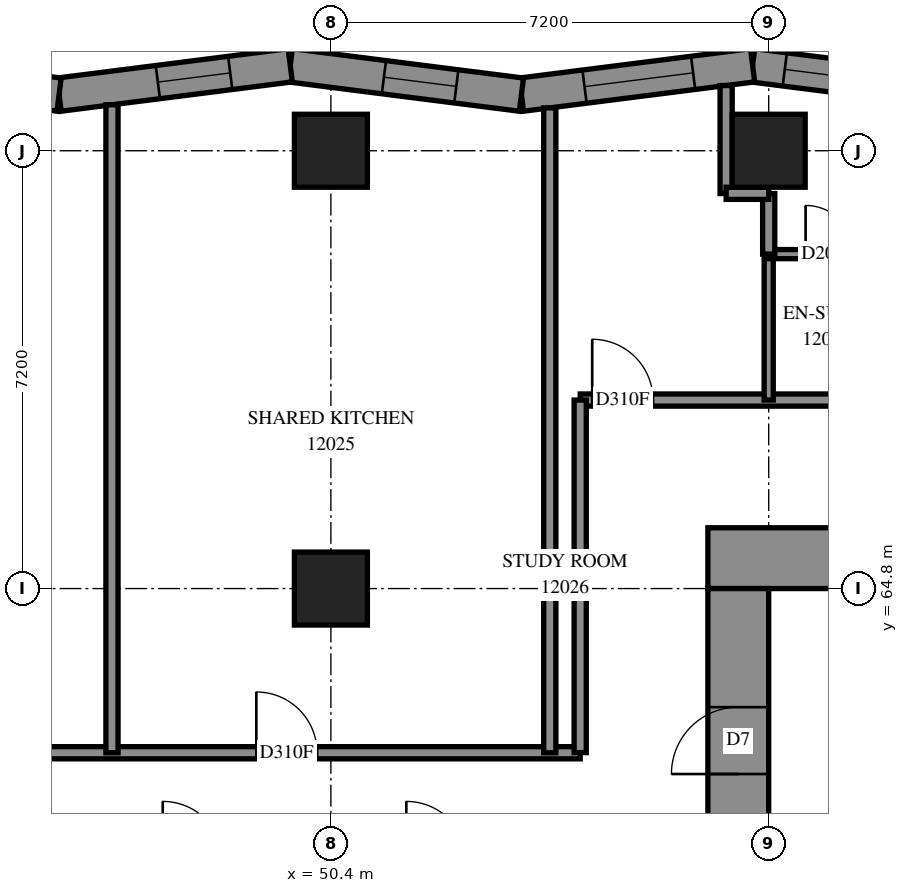
"""IFC4 building model, lengths in metres.
Left out: names, types, materials, properties, quantities, classifications, styles, units other than length and angle.
Written with IfcOpenShell. Run it as: python <this file> out.ifc"""

import sys

from ifc_helpers import new_model, si_unit, direction, frame, frame_2d, origin, origin_2d, place, context, subcontext, project, spatial, polyline, rectangle, outline, extrude, element, fill, save


model = new_model("IFC4")
c1 = context("Model", 3, precision=1e-05, world=origin(), true_north=direction((0.0, 1.0)))
c2 = subcontext(c1, "Body", "Model", "MODEL_VIEW")
j1 = project(units=[si_unit("LENGTHUNIT", "METRE"), si_unit("PLANEANGLEUNIT", "RADIAN")], contexts=[c1])
p1 = place(None, origin())
s1 = spatial("IfcSite", under=j1, at=p1, CompositionType="ELEMENT")
p2 = place(p1, origin())
s2 = spatial("IfcBuilding", under=s1, at=p2, CompositionType="ELEMENT")
p3 = place(p2, frame((0.0, 0.0, 47.4)))
s3 = spatial("IfcBuildingStorey", under=s2, at=p3, CompositionType="ELEMENT", Elevation=47.4)
for number, where, z_axis, x_axis in (
    (1, (50.4, 64.8, 0.0), (0.0, 0.0, 1.0), (1.0, 0.0, 0.0)),
    (2, (50.4, 72.0, 0.0), (0.0, 0.0, 1.0), (1.0, 0.0, 0.0)),
    (3, (57.6, 72.0, 0.0), (0.0, 0.0, 1.0), (1.0, 0.0, 0.0)),
):
    element("IfcColumn", number, at=place(p3, frame(where, z_axis=z_axis, x_axis=x_axis)), inside=s3, PredefinedType="COLUMN", context=c2, shape_type="SweptSolid", body=[
        extrude(rectangle(XDim=1.2, YDim=1.2, at=origin_2d()), origin(), (0.0, 0.0, 1.0), 3.1),
    ])
p4 = place(p3, frame((56.6, 65.3, -0.3), z_axis=(0.0, 0.0, 1.0), x_axis=(1.0, 0.0, 0.0)))
e4 = element("IfcWall", 4, at=p4, inside=s3, PredefinedType="SHEAR", context=c2, shape_type="SweptSolid", body=[
    extrude(rectangle(XDim=16.4, YDim=1.0, at=frame_2d((8.2, 0.0))), origin(), (0.0, 0.0, 1.0), 2.7),
])
p5 = place(p4, frame((11.0, 0.0, 0.3)))
e5 = element("IfcOpeningElement", 5, at=p5, cuts=e4, PredefinedType="OPENING", context=c2, shape_type="SweptSolid", body=[
    extrude(rectangle(XDim=0.8, YDim=2.1, at=frame_2d((0.4, 1.05))), frame((0.0, 0.51, 0.0), z_axis=(0.0, -1.0, 0.0), x_axis=(1.0, 0.0, 0.0)), (0.0, 0.0, 1.0), 1.02),
])
p6 = place(p3, frame((57.1, 50.4, -0.3), z_axis=(0.0, 0.0, 1.0), x_axis=(0.0, 1.0, 0.0)))
e6 = element("IfcWall", 6, at=p6, inside=s3, PredefinedType="SHEAR", context=c2, shape_type="SweptSolid", body=[
    extrude(rectangle(XDim=14.4, YDim=1.0, at=frame_2d((7.2, 0.0))), origin(), (0.0, 0.0, 1.0), 2.7),
])
p7 = place(p6, frame((4.55, 0.0, 0.3)))
e7 = element("IfcOpeningElement", 7, at=p7, cuts=e6, PredefinedType="OPENING", context=c2, shape_type="SweptSolid", body=[
    extrude(rectangle(XDim=1.1, YDim=2.1, at=frame_2d((0.55, 1.05))), frame((0.0, 0.51, 0.0), z_axis=(0.0, -1.0, 0.0), x_axis=(1.0, 0.0, 0.0)), (0.0, 0.0, 1.0), 1.02),
])
p8 = place(p6, frame((11.35, 0.0, 0.3)))
e8 = element("IfcOpeningElement", 8, at=p8, cuts=e6, PredefinedType="OPENING", context=c2, shape_type="SweptSolid", body=[
    extrude(rectangle(XDim=1.1, YDim=2.1, at=frame_2d((0.55, 1.05))), frame((0.0, 0.51, 0.0), z_axis=(0.0, -1.0, 0.0), x_axis=(1.0, 0.0, 0.0)), (0.0, 0.0, 1.0), 1.02),
])
p9 = place(p3, frame((61.137, 72.923, 0.0), z_axis=(0.0, 0.0, 1.0), x_axis=(-0.9920587623, 0.1257752442, 0.0)))
e9 = element("IfcWall", 9, at=p9, inside=s3, PredefinedType="SOLIDWALL", context=c2, shape_type="SweptSolid", body=[
    extrude(outline(polyline([(0.035, -0.275), (3.867, -0.275), (3.797, 0.275), (-0.035, 0.275), (0.035, -0.275)])), origin(), (0.0, 0.0, 1.0), 3.1),
])
p10 = place(p9, frame((0.499, 0.0, 0.5)))
e10 = element("IfcOpeningElement", 10, at=p10, cuts=e9, PredefinedType="OPENING", context=c2, shape_type="SweptSolid", body=[
    extrude(rectangle(XDim=2.8, YDim=2.45, at=frame_2d((1.4, 1.225))), frame((0.0, 0.285, 0.0), z_axis=(0.0, -1.0, 0.0), x_axis=(1.0, 0.0, 0.0)), (0.0, 0.0, 1.0), 0.57),
])
p11 = place(p3, frame((57.335, 73.405, 0.0), z_axis=(0.0, 0.0, 1.0), x_axis=(-0.9920583495, -0.1257785003, 0.0)))
e11 = element("IfcWall", 11, at=p11, inside=s3, PredefinedType="SOLIDWALL", context=c2, shape_type="SweptSolid", body=[
    extrude(outline(polyline([(-0.035, -0.275), (3.797, -0.275), (3.867, 0.275), (0.035, 0.275), (-0.035, -0.275)])), origin(), (0.0, 0.0, 1.0), 3.1),
])
p12 = place(p11, frame((0.986, 0.0, 0.7)))
e12 = element("IfcOpeningElement", 12, at=p12, cuts=e11, PredefinedType="OPENING", context=c2, shape_type="SweptSolid", body=[
    extrude(rectangle(XDim=1.8, YDim=2.2, at=frame_2d((0.9, 1.1))), frame((0.0, 0.285, 0.0), z_axis=(0.0, -1.0, 0.0), x_axis=(1.0, 0.0, 0.0)), (0.0, 0.0, 1.0), 0.57),
])
p13 = place(p3, frame((53.533, 72.923, 0.0), z_axis=(0.0, 0.0, 1.0), x_axis=(-0.9920583495, 0.1257785003, 0.0)))
e13 = element("IfcWall", 13, at=p13, inside=s3, PredefinedType="SOLIDWALL", context=c2, shape_type="SweptSolid", body=[
    extrude(outline(polyline([(0.035, -0.275), (3.867, -0.275), (3.797, 0.275), (-0.035, 0.275), (0.035, -0.275)])), origin(), (0.0, 0.0, 1.0), 3.1),
])
p14 = place(p13, frame((1.079, 0.0, 0.5)))
e14 = element("IfcOpeningElement", 14, at=p14, cuts=e13, PredefinedType="OPENING", context=c2, shape_type="SweptSolid", body=[
    extrude(rectangle(XDim=1.2, YDim=2.45, at=frame_2d((0.6, 1.225))), frame((0.0, 0.285, 0.0), z_axis=(0.0, -1.0, 0.0), x_axis=(1.0, 0.0, 0.0)), (0.0, 0.0, 1.0), 0.57),
])
p15 = place(p3, frame((49.732, 73.405, 0.0), z_axis=(0.0, 0.0, 1.0), x_axis=(-0.9920583495, -0.1257785003, 0.0)))
e15 = element("IfcWall", 15, at=p15, inside=s3, PredefinedType="SOLIDWALL", context=c2, shape_type="SweptSolid", body=[
    extrude(outline(polyline([(-0.035, -0.275), (3.797, -0.275), (3.867, 0.275), (0.035, 0.275), (-0.035, -0.275)])), origin(), (0.0, 0.0, 1.0), 3.1),
])
p16 = place(p15, frame((0.995, 0.0, 0.5)))
e16 = element("IfcOpeningElement", 16, at=p16, cuts=e15, PredefinedType="OPENING", context=c2, shape_type="SweptSolid", body=[
    extrude(rectangle(XDim=1.2, YDim=2.45, at=frame_2d((0.6, 1.225))), frame((0.0, 0.285, 0.0), z_axis=(0.0, -1.0, 0.0), x_axis=(1.0, 0.0, 0.0)), (0.0, 0.0, 1.0), 0.57),
])
p17 = place(p3, frame((45.93, 72.923, 0.0), z_axis=(0.0, 0.0, 1.0), x_axis=(-0.9920583495, 0.1257785003, 0.0)))
e17 = element("IfcWall", 17, at=p17, inside=s3, PredefinedType="SOLIDWALL", context=c2, shape_type="SweptSolid", body=[
    extrude(outline(polyline([(0.035, -0.275), (3.867, -0.275), (3.797, 0.275), (-0.035, 0.275), (0.035, -0.275)])), origin(), (0.0, 0.0, 1.0), 3.1),
])
p18 = place(p17, frame((0.876, 0.0, 0.5)))
e18 = element("IfcOpeningElement", 18, at=p18, cuts=e17, PredefinedType="OPENING", context=c2, shape_type="SweptSolid", body=[
    extrude(rectangle(XDim=1.2, YDim=2.45, at=frame_2d((0.6, 1.225))), frame((0.0, 0.285, 0.0), z_axis=(0.0, -1.0, 0.0), x_axis=(1.0, 0.0, 0.0)), (0.0, 0.0, 1.0), 0.57),
])
p19 = place(p3, frame((33.3, 62.1, 0.0), z_axis=(0.0, 0.0, 1.0), x_axis=(1.0, 0.0, 0.0)))
e19 = element("IfcWall", 19, at=p19, inside=s3, PredefinedType="PARTITIONING", context=c2, shape_type="SweptSolid", body=[
    extrude(rectangle(XDim=21.2, YDim=0.2, at=frame_2d((10.6, 0.0))), origin(), (0.0, 0.0, 1.0), 3.1),
])
p20 = place(p19, frame((1.395, 0.0, 0.0)))
e20 = element("IfcOpeningElement", 20, at=p20, cuts=e19, PredefinedType="OPENING", context=c2, shape_type="SweptSolid", body=[
    extrude(rectangle(XDim=0.9, YDim=2.1, at=frame_2d((0.45, 1.05))), frame((0.0, 0.11, 0.0), z_axis=(0.0, -1.0, 0.0), x_axis=(1.0, 0.0, 0.0)), (0.0, 0.0, 1.0), 0.22),
])
p21 = place(p19, frame((8.674, 0.0, 0.0)))
e21 = element("IfcOpeningElement", 21, at=p21, cuts=e19, PredefinedType="OPENING", context=c2, shape_type="SweptSolid", body=[
    extrude(rectangle(XDim=1.0, YDim=2.1, at=frame_2d((0.5, 1.05))), frame((0.0, 0.11, 0.0), z_axis=(0.0, -1.0, 0.0), x_axis=(1.0, 0.0, 0.0)), (0.0, 0.0, 1.0), 0.22),
])
p22 = place(p19, frame((15.874, 0.0, 0.0)))
e22 = element("IfcOpeningElement", 22, at=p22, cuts=e19, PredefinedType="OPENING", context=c2, shape_type="SweptSolid", body=[
    extrude(rectangle(XDim=1.0, YDim=2.1, at=frame_2d((0.5, 1.05))), frame((0.0, 0.11, 0.0), z_axis=(0.0, -1.0, 0.0), x_axis=(1.0, 0.0, 0.0)), (0.0, 0.0, 1.0), 0.22),
])
p23 = place(p3, frame((54.5, 67.9, 0.0), z_axis=(0.0, 0.0, 1.0), x_axis=(1.0, 0.0, 0.0)))
e23 = element("IfcWall", 23, at=p23, inside=s3, PredefinedType="PARTITIONING", context=c2, shape_type="SweptSolid", body=[
    extrude(rectangle(XDim=20.6, YDim=0.2, at=frame_2d((10.3, 0.0))), origin(), (0.0, 0.0, 1.0), 3.1),
])
p24 = place(p23, frame((0.198, 0.0, 0.0)))
e24 = element("IfcOpeningElement", 24, at=p24, cuts=e23, PredefinedType="OPENING", context=c2, shape_type="SweptSolid", body=[
    extrude(rectangle(XDim=1.0, YDim=2.1, at=frame_2d((0.5, 1.05))), frame((0.0, 0.11, 0.0), z_axis=(0.0, -1.0, 0.0), x_axis=(1.0, 0.0, 0.0)), (0.0, 0.0, 1.0), 0.22),
])
p25 = place(p23, frame((19.358, 0.0, 0.0)))
e25 = element("IfcOpeningElement", 25, at=p25, cuts=e23, PredefinedType="OPENING", context=c2, shape_type="SweptSolid", body=[
    extrude(rectangle(XDim=1.0, YDim=2.1, at=frame_2d((0.5, 1.05))), frame((0.0, 0.11, 0.0), z_axis=(0.0, -1.0, 0.0), x_axis=(1.0, 0.0, 0.0)), (0.0, 0.0, 1.0), 0.22),
])
p26 = place(p23, frame((6.698, 0.0, 0.0)))
e26 = element("IfcOpeningElement", 26, at=p26, cuts=e23, PredefinedType="OPENING", context=c2, shape_type="SweptSolid", body=[
    extrude(rectangle(XDim=0.9, YDim=2.1, at=frame_2d((0.45, 1.05))), frame((0.0, 0.11, 0.0), z_axis=(0.0, -1.0, 0.0), x_axis=(1.0, 0.0, 0.0)), (0.0, 0.0, 1.0), 0.22),
])
p27 = place(p23, frame((13.884, 0.0, 0.0)))
e27 = element("IfcOpeningElement", 27, at=p27, cuts=e23, PredefinedType="OPENING", context=c2, shape_type="SweptSolid", body=[
    extrude(rectangle(XDim=1.0, YDim=2.1, at=frame_2d((0.5, 1.05))), frame((0.0, 0.11, 0.0), z_axis=(0.0, -1.0, 0.0), x_axis=(1.0, 0.0, 0.0)), (0.0, 0.0, 1.0), 0.22),
])
p28 = place(p3, frame((46.8, 62.1, 0.0), z_axis=(0.0, 0.0, 1.0), x_axis=(0.0, 1.0, 0.0)))
e28 = element("IfcWall", 28, at=p28, inside=s3, PredefinedType="PARTITIONING", context=c2, shape_type="SweptSolid", body=[
    extrude(rectangle(XDim=10.656, YDim=0.2, at=frame_2d((5.328, 0.0))), origin(), (0.0, 0.0, 1.0), 3.1),
])
p29 = place(p3, frame((54.0, 62.1, 0.0), z_axis=(0.0, 0.0, 1.0), x_axis=(0.0, 1.0, 0.0)))
e29 = element("IfcWall", 29, at=p29, inside=s3, PredefinedType="PARTITIONING", context=c2, shape_type="SweptSolid", body=[
    extrude(rectangle(XDim=10.605, YDim=0.2, at=frame_2d((5.302, 0.0))), origin(), (0.0, 0.0, 1.0), 3.1),
])
p30 = place(p3, frame((54.5, 62.102, 0.0), z_axis=(0.0, 0.0, 1.0), x_axis=(0.0, 1.0, 0.0)))
e30 = element("IfcWall", 30, at=p30, inside=s3, PredefinedType="PARTITIONING", context=c2, shape_type="SweptSolid", body=[
    extrude(rectangle(XDim=5.798, YDim=0.2, at=frame_2d((2.899, 0.0))), origin(), (0.0, 0.0, 1.0), 3.1),
])
p31 = place(p3, frame((57.6, 67.9, 0.0), z_axis=(0.0, 0.0, 1.0), x_axis=(0.0, 1.0, 0.0)))
e31 = element("IfcWall", 31, at=p31, inside=s3, PredefinedType="PARTITIONING", context=c2, shape_type="SweptSolid", body=[
    extrude(rectangle(XDim=2.4, YDim=0.15, at=frame_2d((1.2, 0.0))), origin(), (0.0, 0.0, 1.0), 3.1),
])
p32 = place(p3, frame((57.6, 70.3, 0.0), z_axis=(0.0, 0.0, 1.0), x_axis=(1.0, 0.0, 0.0)))
e32 = element("IfcWall", 32, at=p32, inside=s3, PredefinedType="PARTITIONING", context=c2, shape_type="SweptSolid", body=[
    extrude(rectangle(XDim=1.9, YDim=0.15, at=frame_2d((0.95, 0.0))), origin(), (0.0, 0.0, 1.0), 3.1),
])
p33 = place(p32, frame((0.607, 0.0, 0.0)))
e33 = element("IfcOpeningElement", 33, at=p33, cuts=e32, PredefinedType="OPENING", context=c2, shape_type="SweptSolid", body=[
    extrude(rectangle(XDim=0.8, YDim=2.1, at=frame_2d((0.4, 1.05))), frame((0.0, 0.085, 0.0), z_axis=(0.0, -1.0, 0.0), x_axis=(1.0, 0.0, 0.0)), (0.0, 0.0, 1.0), 0.17),
])
p34 = place(p3, frame((56.9, 71.296, 0.0), z_axis=(0.0, 0.0, 1.0), x_axis=(0.0, 1.0, 0.0)))
e34 = element("IfcWall", 34, at=p34, inside=s3, PredefinedType="PARTITIONING", context=c2, shape_type="SweptSolid", body=[
    extrude(rectangle(XDim=1.776, YDim=0.2, at=frame_2d((0.888, 0.0))), origin(), (0.0, 0.0, 1.0), 3.1),
])
p35 = place(p3, frame((57.6, 70.3, 0.0), z_axis=(0.0, 0.0, 1.0), x_axis=(0.0, 1.0, 0.0)))
e35 = element("IfcWall", 35, at=p35, inside=s3, PredefinedType="PARTITIONING", context=c2, shape_type="SweptSolid", body=[
    extrude(rectangle(XDim=0.996, YDim=0.2, at=frame_2d((0.498, 0.0))), origin(), (0.0, 0.0, 1.0), 3.1),
])
p36 = place(p3, frame((56.9, 71.3, 0.0), z_axis=(0.0, 0.0, 1.0), x_axis=(1.0, 0.0, 0.0)))
e36 = element("IfcWall", 36, at=p36, inside=s3, PredefinedType="PARTITIONING", context=c2, shape_type="SweptSolid", body=[
    extrude(rectangle(XDim=0.7, YDim=0.2, at=frame_2d((0.35, 0.0))), origin(), (0.0, 0.0, 1.0), 3.1),
])
p37 = place(p10, origin())
e37 = element("IfcWindow", 37, at=p37, inside=s3, PartitioningType="SINGLE_PANEL", PredefinedType="WINDOW", context=c2, shape_type="SweptSolid", body=[
    extrude(rectangle(XDim=2.8, YDim=2.45, at=frame_2d((1.4, 1.225))), frame((0.0, 0.155, 0.0), z_axis=(0.0, -1.0, 0.0), x_axis=(1.0, 0.0, 0.0)), (0.0, 0.0, 1.0), 0.06),
])
fill(e10, e37)
p38 = place(p14, origin())
e38 = element("IfcWindow", 38, at=p38, inside=s3, PartitioningType="SINGLE_PANEL", PredefinedType="WINDOW", context=c2, shape_type="SweptSolid", body=[
    extrude(rectangle(XDim=1.2, YDim=2.45, at=frame_2d((0.6, 1.225))), frame((0.0, 0.155, 0.0), z_axis=(0.0, -1.0, 0.0), x_axis=(1.0, 0.0, 0.0)), (0.0, 0.0, 1.0), 0.06),
])
fill(e14, e38)
p39 = place(p16, origin())
e39 = element("IfcWindow", 39, at=p39, inside=s3, PartitioningType="SINGLE_PANEL", PredefinedType="WINDOW", context=c2, shape_type="SweptSolid", body=[
    extrude(rectangle(XDim=1.2, YDim=2.45, at=frame_2d((0.6, 1.225))), frame((0.0, 0.155, 0.0), z_axis=(0.0, -1.0, 0.0), x_axis=(1.0, 0.0, 0.0)), (0.0, 0.0, 1.0), 0.06),
])
fill(e16, e39)
p40 = place(p8, origin())
e40 = element("IfcDoor", 40, at=p40, inside=s3, OperationType="SINGLE_SWING_LEFT", PredefinedType="DOOR", context=c2, shape_type="SweptSolid", body=[
    extrude(rectangle(XDim=1.1, YDim=2.1, at=frame_2d((0.55, 1.05))), frame((0.0, 0.025, 0.0), z_axis=(0.0, -1.0, 0.0), x_axis=(1.0, 0.0, 0.0)), (0.0, 0.0, 1.0), 0.05),
])
fill(e8, e40)
p41 = place(p22, origin())
e41 = element("IfcDoor", 41, at=p41, inside=s3, OperationType="SINGLE_SWING_LEFT", PredefinedType="DOOR", context=c2, shape_type="SweptSolid", body=[
    extrude(rectangle(XDim=1.0, YDim=2.1, at=frame_2d((0.5, 1.05))), frame((0.0, 0.025, 0.0), z_axis=(0.0, -1.0, 0.0), x_axis=(1.0, 0.0, 0.0)), (0.0, 0.0, 1.0), 0.05),
])
fill(e22, e41)
p42 = place(p24, origin())
e42 = element("IfcDoor", 42, at=p42, inside=s3, OperationType="SINGLE_SWING_LEFT", PredefinedType="DOOR", context=c2, shape_type="SweptSolid", body=[
    extrude(rectangle(XDim=1.0, YDim=2.1, at=frame_2d((0.5, 1.05))), frame((0.0, 0.025, 0.0), z_axis=(0.0, -1.0, 0.0), x_axis=(1.0, 0.0, 0.0)), (0.0, 0.0, 1.0), 0.05),
])
fill(e24, e42)
p43 = place(p33, origin())
e43 = element("IfcDoor", 43, at=p43, inside=s3, OperationType="SINGLE_SWING_RIGHT", PredefinedType="DOOR", context=c2, shape_type="SweptSolid", body=[
    extrude(rectangle(XDim=0.8, YDim=2.1, at=frame_2d((0.4, 1.05))), frame((0.0, 0.025, 0.0), z_axis=(0.0, -1.0, 0.0), x_axis=(1.0, 0.0, 0.0)), (0.0, 0.0, 1.0), 0.05),
])
fill(e33, e43)
p44 = place(p12, origin())
e44 = element("IfcWindow", 44, at=p44, inside=s3, PartitioningType="SINGLE_PANEL", PredefinedType="WINDOW", context=c2, shape_type="SweptSolid", body=[
    extrude(rectangle(XDim=1.8, YDim=2.2, at=frame_2d((0.9, 1.1))), frame((0.0, 0.155, 0.0), z_axis=(0.0, -1.0, 0.0), x_axis=(1.0, 0.0, 0.0)), (0.0, 0.0, 1.0), 0.06),
])
fill(e12, e44)
save(model, sys.argv[1])
